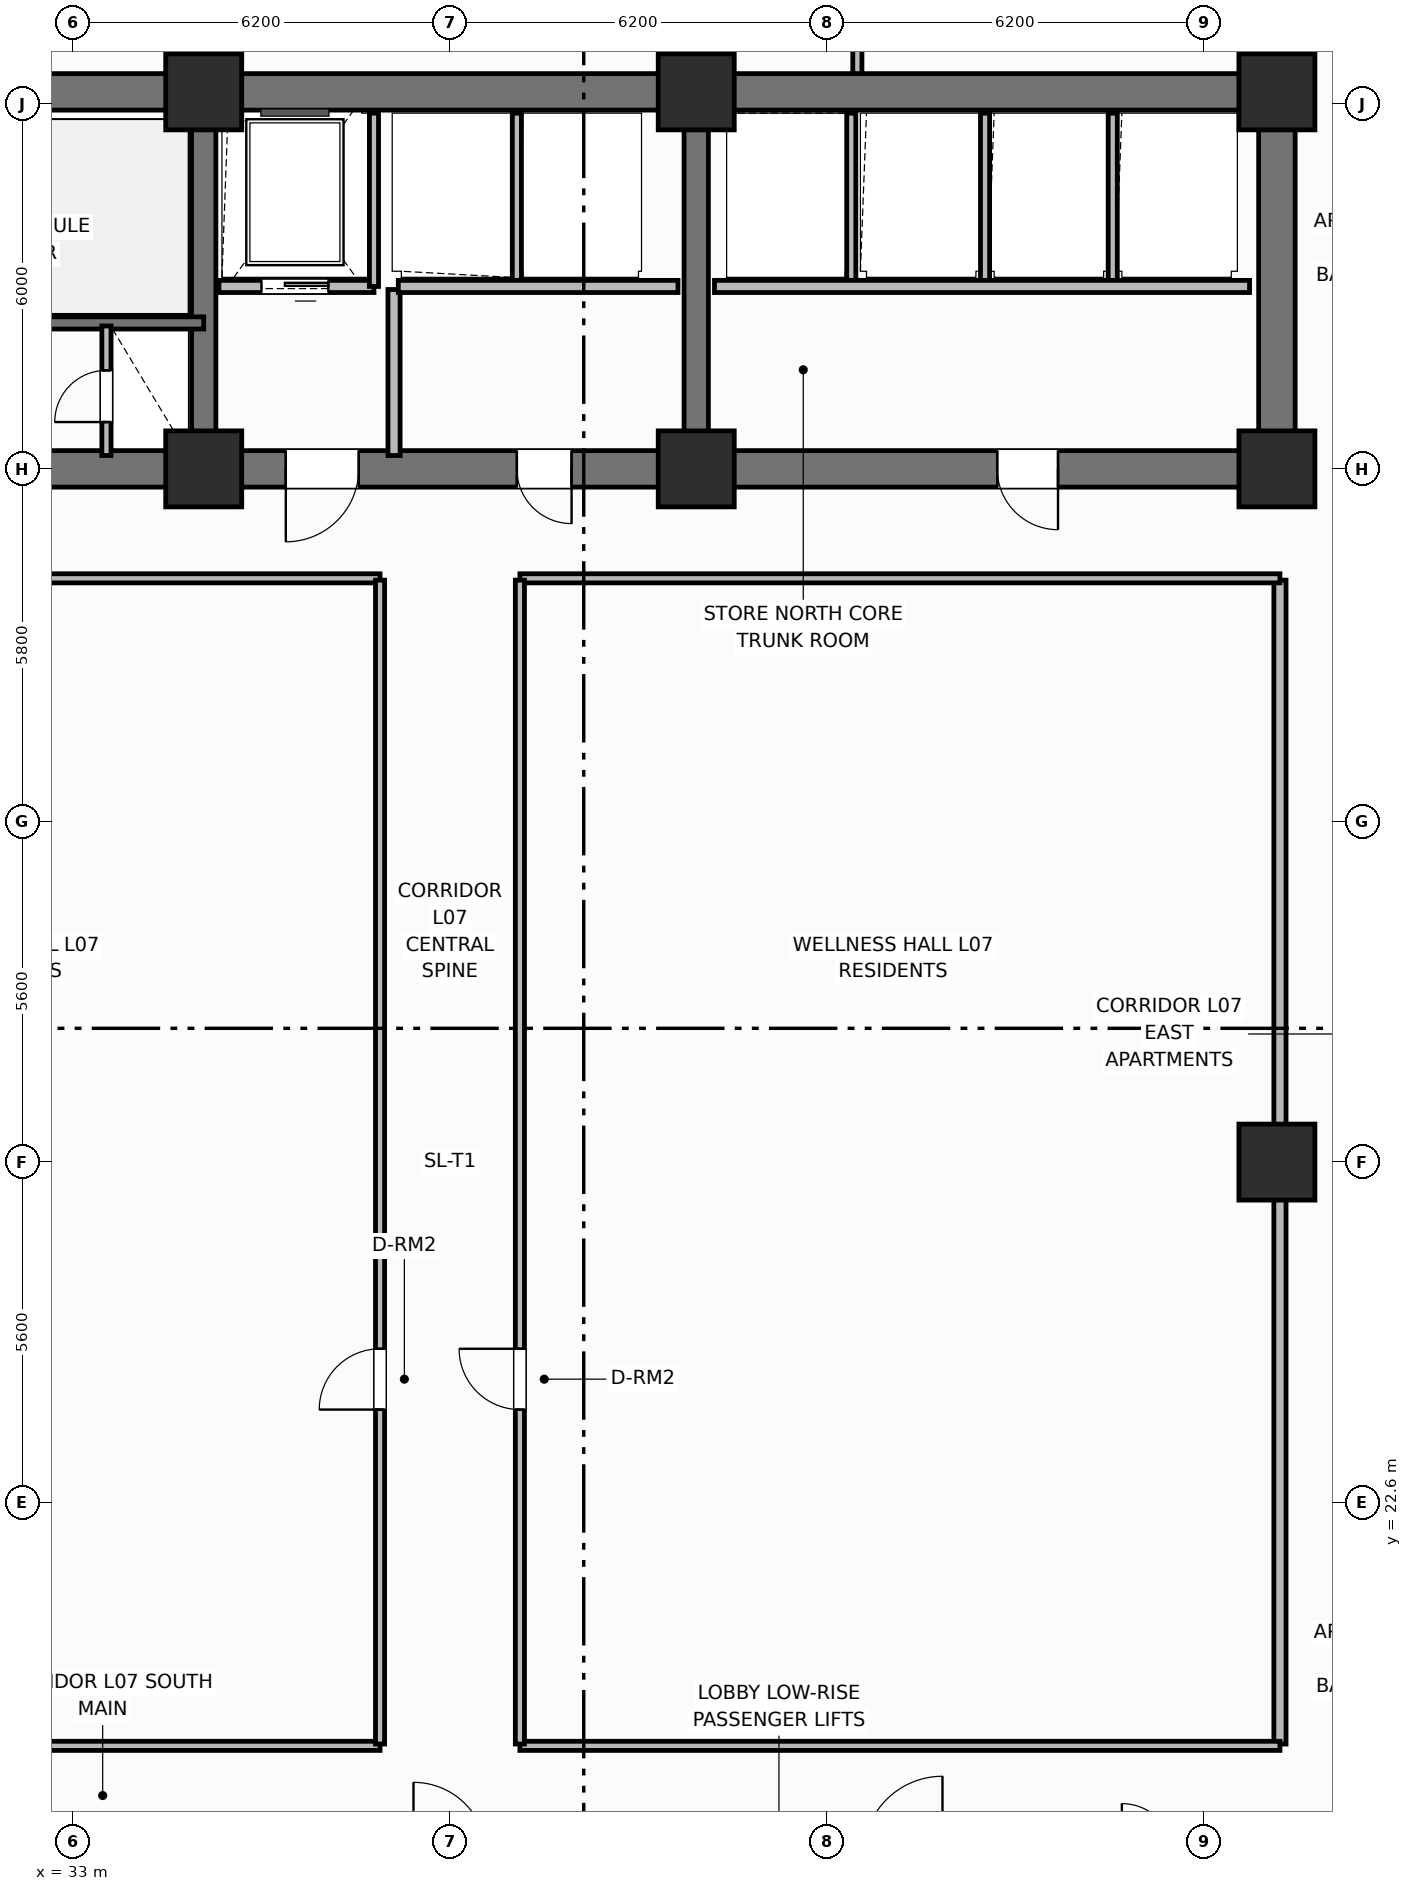
"""IFC4 building model, lengths in metres.
Left out: names, types, materials, properties, quantities, classifications, styles, units other than length and angle.
Written with IfcOpenShell. Run it as: python <this file> out.ifc"""

import sys

from ifc_helpers import new_model, si_unit, direction, frame, frame_2d, origin, origin_2d, place, context, subcontext, project, spatial, rectangle, extrude, element, fill, save


model = new_model("IFC4")
c1 = context("Model", 3, precision=1e-05, world=origin(), true_north=direction((0.0, 1.0)))
c2 = subcontext(c1, "Body", "Model", "MODEL_VIEW")
j1 = project(units=[si_unit("LENGTHUNIT", "METRE"), si_unit("PLANEANGLEUNIT", "RADIAN")], contexts=[c1])
p1 = place(None, origin())
s1 = spatial("IfcSite", under=j1, at=p1, CompositionType="ELEMENT")
p2 = place(p1, origin())
s2 = spatial("IfcBuilding", under=s1, at=p2, CompositionType="ELEMENT")
p3 = place(p2, frame((0.0, 0.0, 32.5)))
s3 = spatial("IfcBuildingStorey", under=s2, at=p3, CompositionType="ELEMENT", Elevation=32.5)
p4 = place(p3, frame((25.6, 45.8, 0.0), z_axis=(0.0, 0.0, 1.0), x_axis=(1.0, 0.0, 0.0)))
e1 = element("IfcWall", 1, at=p4, inside=s3, PredefinedType="SHEAR", context=c2, shape_type="SweptSolid", body=[
    extrude(rectangle(XDim=27.2, YDim=0.6, at=frame_2d((13.6, 0.0))), origin(), (0.0, 0.0, 1.0), 3.7),
])
p5 = place(p3, frame((52.8, 39.9, 0.0), z_axis=(0.0, 0.0, 1.0), x_axis=(0.0, 1.0, 0.0)))
e2 = element("IfcWall", 2, at=p5, inside=s3, PredefinedType="SHEAR", context=c2, shape_type="SweptSolid", body=[
    extrude(rectangle(XDim=5.6, YDim=0.6, at=frame_2d((2.8, 0.0))), origin(), (0.0, 0.0, 1.0), 3.7),
])
p6 = place(p3, frame((52.8, 39.6, 0.0), z_axis=(0.0, 0.0, 1.0), x_axis=(-1.0, 0.0, 0.0)))
e3 = element("IfcWall", 3, at=p6, inside=s3, PredefinedType="SHEAR", context=c2, shape_type="SweptSolid", body=[
    extrude(rectangle(XDim=27.2, YDim=0.6, at=frame_2d((13.6, 0.0))), origin(), (0.0, 0.0, 1.0), 3.7),
])
p7 = place(p6, frame((24.2, 0.0, 0.0)))
e4 = element("IfcOpeningElement", 4, at=p7, cuts=e3, PredefinedType="OPENING", context=c2, shape_type="SweptSolid", body=[
    extrude(rectangle(XDim=1.1, YDim=2.15, at=frame_2d((0.55, 1.075))), frame((0.0, 0.31, 0.0), z_axis=(0.0, -1.0, 0.0), x_axis=(1.0, 0.0, 0.0)), (0.0, 0.0, 1.0), 0.62),
])
p8 = place(p6, frame((15.1, 0.0, 0.0)))
e5 = element("IfcOpeningElement", 5, at=p8, cuts=e3, PredefinedType="OPENING", context=c2, shape_type="SweptSolid", body=[
    extrude(rectangle(XDim=1.2, YDim=2.15, at=frame_2d((0.6, 1.075))), frame((0.0, 0.31, 0.0), z_axis=(0.0, -1.0, 0.0), x_axis=(1.0, 0.0, 0.0)), (0.0, 0.0, 1.0), 0.62),
])
p9 = place(p6, frame((11.6, 0.0, 0.0)))
e6 = element("IfcOpeningElement", 6, at=p9, cuts=e3, PredefinedType="OPENING", context=c2, shape_type="SweptSolid", body=[
    extrude(rectangle(XDim=0.9, YDim=2.1, at=frame_2d((0.45, 1.05))), frame((0.0, 0.31, 0.0), z_axis=(0.0, -1.0, 0.0), x_axis=(1.0, 0.0, 0.0)), (0.0, 0.0, 1.0), 0.62),
])
p10 = place(p6, frame((3.6, 0.0, 0.0)))
e7 = element("IfcOpeningElement", 7, at=p10, cuts=e3, PredefinedType="OPENING", context=c2, shape_type="SweptSolid", body=[
    extrude(rectangle(XDim=1.0, YDim=2.15, at=frame_2d((0.5, 1.075))), frame((0.0, 0.31, 0.0), z_axis=(0.0, -1.0, 0.0), x_axis=(1.0, 0.0, 0.0)), (0.0, 0.0, 1.0), 0.62),
])
for number, where, z_axis, x_axis in (
    (8, (35.15, 39.9, 0.0), (0.0, 0.0, 1.0), (0.0, 1.0, 0.0)),
    (9, (43.25, 39.9, 0.0), (0.0, 0.0, 1.0), (0.0, 1.0, 0.0)),
):
    element("IfcWall", number, at=place(p3, frame(where, z_axis=z_axis, x_axis=x_axis)), inside=s3, PredefinedType="SHEAR", context=c2, shape_type="SweptSolid", body=[
        extrude(rectangle(XDim=5.6, YDim=0.4, at=frame_2d((2.8, 0.0))), origin(), (0.0, 0.0, 1.0), 3.7),
    ])
for number, where, z_axis, x_axis in (
    (10, (35.15, 39.6, 0.0), (0.0, 0.0, 1.0), (1.0, 0.0, 0.0)),
    (11, (35.15, 45.8, 0.0), (0.0, 0.0, 1.0), (1.0, 0.0, 0.0)),
    (12, (43.25, 39.6, 0.0), (0.0, 0.0, 1.0), (1.0, 0.0, 0.0)),
    (13, (43.25, 45.8, 0.0), (0.0, 0.0, 1.0), (1.0, 0.0, 0.0)),
    (14, (52.8, 39.6, 0.0), (0.0, 0.0, 1.0), (1.0, 0.0, 0.0)),
    (15, (52.8, 45.8, 0.0), (0.0, 0.0, 1.0), (1.0, 0.0, 0.0)),
    (16, (52.8, 28.2, 0.0), (0.0, 0.0, 1.0), (1.0, 0.0, 0.0)),
):
    element("IfcColumn", number, at=place(p3, frame(where, z_axis=z_axis, x_axis=x_axis)), inside=s3, PredefinedType="COLUMN", context=c2, shape_type="SweptSolid", body=[
        extrude(rectangle(XDim=1.25, YDim=1.25, at=origin_2d()), origin(), (0.0, 0.0, 1.0), 3.7),
    ])
p11 = place(p3, frame((35.15, 42.0, 0.0), z_axis=(0.0, 0.0, 1.0), x_axis=(-1.0, 0.0, 0.0)))
e17 = element("IfcWall", 17, at=p11, inside=s3, PredefinedType="SHEAR", context=c2, shape_type="SweptSolid", body=[
    extrude(rectangle(XDim=9.55, YDim=0.2, at=frame_2d((4.775, 0.0))), origin(), (0.0, 0.0, 1.0), 3.7),
])
p12 = place(p11, frame((7.25, 0.0, 0.0)))
e18 = element("IfcOpeningElement", 18, at=p12, cuts=e17, PredefinedType="OPENING", context=c2, shape_type="SweptSolid", body=[
    extrude(rectangle(XDim=1.1, YDim=2.15, at=frame_2d((0.55, 1.075))), frame((0.0, 0.11, 0.0), z_axis=(0.0, -1.0, 0.0), x_axis=(1.0, 0.0, 0.0)), (0.0, 0.0, 1.0), 0.22),
])
p13 = place(p3, frame((33.55, 39.82, 0.0), z_axis=(0.0, 0.0, 1.0), x_axis=(0.0, 1.0, 0.0)))
e19 = element("IfcWall", 19, at=p13, inside=s3, PredefinedType="PARTITIONING", context=c2, shape_type="SweptSolid", body=[
    extrude(rectangle(XDim=2.13, YDim=0.15, at=frame_2d((1.065, 0.0))), origin(), (0.0, 0.0, 1.0), 2.53),
])
p14 = place(p13, frame((0.55, 0.0, 0.0)))
e20 = element("IfcOpeningElement", 20, at=p14, cuts=e19, PredefinedType="OPENING", context=c2, shape_type="SweptSolid", body=[
    extrude(rectangle(XDim=0.85, YDim=2.05, at=frame_2d((0.425, 1.025))), frame((0.0, 0.085, 0.0), z_axis=(0.0, -1.0, 0.0), x_axis=(1.0, 0.0, 0.0)), (0.0, 0.0, 1.0), 0.17),
])
p15 = place(p3, frame((37.95, 42.6, 0.0), z_axis=(0.0, 0.0, 1.0), x_axis=(-1.0, 0.0, 0.0)))
e21 = element("IfcWall", 21, at=p15, inside=s3, PredefinedType="PARTITIONING", context=c2, shape_type="SweptSolid", body=[
    extrude(rectangle(XDim=2.55, YDim=0.2, at=frame_2d((1.275, 0.0))), origin(), (0.0, 0.0, 1.0), 2.3),
])
p16 = place(p15, frame((0.75, 0.0, 0.0)))
e22 = element("IfcOpeningElement", 22, at=p16, cuts=e21, PredefinedType="OPENING", context=c2, shape_type="SweptSolid", body=[
    extrude(rectangle(XDim=1.1, YDim=2.15, at=frame_2d((0.55, 1.075))), frame((0.0, 0.11, 0.0), z_axis=(0.0, -1.0, 0.0), x_axis=(1.0, 0.0, 0.0)), (0.0, 0.0, 1.0), 0.22),
])
p17 = place(p3, frame((37.95, 42.6, 0.0), z_axis=(0.0, 0.0, 1.0), x_axis=(0.0, 1.0, 0.0)))
e23 = element("IfcWall", 23, at=p17, inside=s3, PredefinedType="PARTITIONING", context=c2, shape_type="SweptSolid", body=[
    extrude(rectangle(XDim=2.85, YDim=0.15, at=frame_2d((1.425, 0.0))), origin(), (0.0, 0.0, 1.0), 2.53),
])
p18 = place(p3, frame((38.28, 39.82, 0.0), z_axis=(0.0, 0.0, 1.0), x_axis=(0.0, 1.0, 0.0)))
e24 = element("IfcWall", 24, at=p18, inside=s3, PredefinedType="PARTITIONING", context=c2, shape_type="SweptSolid", body=[
    extrude(rectangle(XDim=2.73, YDim=0.2, at=frame_2d((1.365, 0.0))), origin(), (0.0, 0.0, 1.0), 2.53),
])
p19 = place(p3, frame((40.3, 42.65, 0.0), z_axis=(0.0, 0.0, 1.0), x_axis=(0.0, 1.0, 0.0)))
e25 = element("IfcWall", 25, at=p19, inside=s3, PredefinedType="PARTITIONING", context=c2, shape_type="SweptSolid", body=[
    extrude(rectangle(XDim=2.8, YDim=0.15, at=frame_2d((1.4, 0.0))), origin(), (0.0, 0.0, 1.0), 2.53),
])
p20 = place(p3, frame((42.95, 42.6, 0.0), z_axis=(0.0, 0.0, 1.0), x_axis=(-1.0, 0.0, 0.0)))
e26 = element("IfcWall", 26, at=p20, inside=s3, PredefinedType="PARTITIONING", context=c2, shape_type="SweptSolid", body=[
    extrude(rectangle(XDim=4.6, YDim=0.2, at=frame_2d((2.3, 0.0))), origin(), (0.0, 0.0, 1.0), 2.3),
])
for number, where, z_axis, x_axis in (
    (27, (45.8, 42.65, 0.0), (0.0, 0.0, 1.0), (0.0, 1.0, 0.0)),
    (28, (48.0, 42.65, 0.0), (0.0, 0.0, 1.0), (0.0, 1.0, 0.0)),
    (29, (50.1, 42.65, 0.0), (0.0, 0.0, 1.0), (0.0, 1.0, 0.0)),
):
    element("IfcWall", number, at=place(p3, frame(where, z_axis=z_axis, x_axis=x_axis)), inside=s3, PredefinedType="PARTITIONING", context=c2, shape_type="SweptSolid", body=[
        extrude(rectangle(XDim=2.8, YDim=0.15, at=frame_2d((1.4, 0.0))), origin(), (0.0, 0.0, 1.0), 2.53),
    ])
p21 = place(p3, frame((52.35, 42.6, 0.0), z_axis=(0.0, 0.0, 1.0), x_axis=(-1.0, 0.0, 0.0)))
e30 = element("IfcWall", 30, at=p21, inside=s3, PredefinedType="PARTITIONING", context=c2, shape_type="SweptSolid", body=[
    extrude(rectangle(XDim=8.8, YDim=0.2, at=frame_2d((4.4, 0.0))), origin(), (0.0, 0.0, 1.0), 2.53),
])
p22 = place(p3, frame((52.85, 18.63, 0.0), z_axis=(0.0, 0.0, 1.0), x_axis=(0.0, 1.0, 0.0)))
e31 = element("IfcWall", 31, at=p22, inside=s3, PredefinedType="PARTITIONING", context=c2, shape_type="SweptSolid", body=[
    extrude(rectangle(XDim=19.14, YDim=0.2, at=frame_2d((9.57, 0.0))), origin(), (0.0, 0.0, 1.0), 2.53),
])
for number, where, z_axis, x_axis in (
    (32, (25.55, 18.6, 0.0), (0.0, 0.0, 1.0), (1.0, 0.0, 0.0)),
    (33, (40.35, 18.6, 0.0), (0.0, 0.0, 1.0), (1.0, 0.0, 0.0)),
    (34, (25.55, 37.8, 0.0), (0.0, 0.0, 1.0), (1.0, 0.0, 0.0)),
    (35, (40.35, 37.8, 0.0), (0.0, 0.0, 1.0), (1.0, 0.0, 0.0)),
):
    element("IfcWall", number, at=place(p3, frame(where, z_axis=z_axis, x_axis=x_axis)), inside=s3, PredefinedType="PARTITIONING", context=c2, shape_type="SweptSolid", body=[
        extrude(rectangle(XDim=12.5, YDim=0.15, at=frame_2d((6.25, 0.0))), origin(), (0.0, 0.0, 1.0), 2.53),
    ])
p23 = place(p3, frame((38.05, 18.63, 0.0), z_axis=(0.0, 0.0, 1.0), x_axis=(0.0, 1.0, 0.0)))
e36 = element("IfcWall", 36, at=p23, inside=s3, PredefinedType="PARTITIONING", context=c2, shape_type="SweptSolid", body=[
    extrude(rectangle(XDim=19.14, YDim=0.15, at=frame_2d((9.57, 0.0))), origin(), (0.0, 0.0, 1.0), 2.53),
])
p24 = place(p23, frame((5.5, 0.0, 0.0)))
e37 = element("IfcOpeningElement", 37, at=p24, cuts=e36, PredefinedType="OPENING", context=c2, shape_type="SweptSolid", body=[
    extrude(rectangle(XDim=1.0, YDim=2.15, at=frame_2d((0.5, 1.075))), frame((0.0, 0.085, 0.0), z_axis=(0.0, -1.0, 0.0), x_axis=(1.0, 0.0, 0.0)), (0.0, 0.0, 1.0), 0.17),
])
p25 = place(p3, frame((40.35, 18.63, 0.0), z_axis=(0.0, 0.0, 1.0), x_axis=(0.0, 1.0, 0.0)))
e38 = element("IfcWall", 38, at=p25, inside=s3, PredefinedType="PARTITIONING", context=c2, shape_type="SweptSolid", body=[
    extrude(rectangle(XDim=19.14, YDim=0.15, at=frame_2d((9.57, 0.0))), origin(), (0.0, 0.0, 1.0), 2.53),
])
p26 = place(p25, frame((5.5, 0.0, 0.0)))
e39 = element("IfcOpeningElement", 39, at=p26, cuts=e38, PredefinedType="OPENING", context=c2, shape_type="SweptSolid", body=[
    extrude(rectangle(XDim=1.0, YDim=2.15, at=frame_2d((0.5, 1.075))), frame((0.0, 0.085, 0.0), z_axis=(0.0, -1.0, 0.0), x_axis=(1.0, 0.0, 0.0)), (0.0, 0.0, 1.0), 0.17),
])
p27 = place(p3, frame((45.9, 46.1, 0.0), z_axis=(0.0, 0.0, 1.0), x_axis=(0.0, 1.0, 0.0)))
e40 = element("IfcWall", 40, at=p27, inside=s3, PredefinedType="PARTITIONING", context=c2, shape_type="SweptSolid", body=[
    extrude(rectangle(XDim=5.33, YDim=0.15, at=frame_2d((2.665, 0.0))), origin(), (0.0, 0.0, 1.0), 2.53),
])
p28 = place(p3, frame((53.0, 46.1, 0.0), z_axis=(0.0, 0.0, 1.0), x_axis=(0.0, 1.0, 0.0)))
e41 = element("IfcWall", 41, at=p28, inside=s3, PredefinedType="PARTITIONING", context=c2, shape_type="SweptSolid", body=[
    extrude(rectangle(XDim=4.73, YDim=0.2, at=frame_2d((2.365, 0.0))), origin(), (0.0, 0.0, 1.0), 2.53),
])
p29 = place(p28, frame((1.05, 0.0, 0.0)))
e42 = element("IfcOpeningElement", 42, at=p29, cuts=e41, PredefinedType="OPENING", context=c2, shape_type="SweptSolid", body=[
    extrude(rectangle(XDim=0.9, YDim=2.1, at=frame_2d((0.45, 1.05))), frame((0.0, 0.11, 0.0), z_axis=(0.0, -1.0, 0.0), x_axis=(1.0, 0.0, 0.0)), (0.0, 0.0, 1.0), 0.22),
])
p30 = place(p14, origin())
e43 = element("IfcDoor", 43, at=p30, inside=s3, OperationType="SINGLE_SWING_LEFT", PredefinedType="TRAPDOOR", context=c2, shape_type="SweptSolid", body=[
    extrude(rectangle(XDim=0.85, YDim=2.05, at=frame_2d((0.425, 1.025))), frame((0.0, 0.025, 0.0), z_axis=(0.0, -1.0, 0.0), x_axis=(1.0, 0.0, 0.0)), (0.0, 0.0, 1.0), 0.05),
])
fill(e20, e43)
p31 = place(p16, origin())
e44 = element("IfcDoor", 44, at=p31, inside=s3, OperationType="SLIDING_TO_LEFT", PredefinedType="DOOR", context=c2, shape_type="SweptSolid", body=[
    extrude(rectangle(XDim=1.1, YDim=2.15, at=frame_2d((0.55, 1.075))), frame((0.0, 0.025, 0.0), z_axis=(0.0, -1.0, 0.0), x_axis=(1.0, 0.0, 0.0)), (0.0, 0.0, 1.0), 0.05),
])
fill(e22, e44)
p32 = place(p24, origin())
e45 = element("IfcDoor", 45, at=p32, inside=s3, OperationType="SINGLE_SWING_LEFT", PredefinedType="DOOR", context=c2, shape_type="SweptSolid", body=[
    extrude(rectangle(XDim=1.0, YDim=2.15, at=frame_2d((0.5, 1.075))), frame((0.0, 0.025, 0.0), z_axis=(0.0, -1.0, 0.0), x_axis=(1.0, 0.0, 0.0)), (0.0, 0.0, 1.0), 0.05),
])
fill(e37, e45)
p33 = place(p26, origin())
e46 = element("IfcDoor", 46, at=p33, inside=s3, OperationType="SINGLE_SWING_RIGHT", PredefinedType="DOOR", context=c2, shape_type="SweptSolid", body=[
    extrude(rectangle(XDim=1.0, YDim=2.15, at=frame_2d((0.5, 1.075))), frame((0.0, 0.025, 0.0), z_axis=(0.0, -1.0, 0.0), x_axis=(1.0, 0.0, 0.0)), (0.0, 0.0, 1.0), 0.05),
])
fill(e39, e46)
p34 = place(p8, origin())
e47 = element("IfcDoor", 47, at=p34, inside=s3, OperationType="SINGLE_SWING_RIGHT", PredefinedType="DOOR", context=c2, shape_type="SweptSolid", body=[
    extrude(rectangle(XDim=1.2, YDim=2.15, at=frame_2d((0.6, 1.075))), frame((0.0, 0.025, 0.0), z_axis=(0.0, -1.0, 0.0), x_axis=(1.0, 0.0, 0.0)), (0.0, 0.0, 1.0), 0.05),
])
fill(e5, e47)
p35 = place(p9, origin())
e48 = element("IfcDoor", 48, at=p35, inside=s3, OperationType="SINGLE_SWING_LEFT", PredefinedType="DOOR", context=c2, shape_type="SweptSolid", body=[
    extrude(rectangle(XDim=0.9, YDim=2.1, at=frame_2d((0.45, 1.05))), frame((0.0, 0.025, 0.0), z_axis=(0.0, -1.0, 0.0), x_axis=(1.0, 0.0, 0.0)), (0.0, 0.0, 1.0), 0.05),
])
fill(e6, e48)
p36 = place(p10, origin())
e49 = element("IfcDoor", 49, at=p36, inside=s3, OperationType="SINGLE_SWING_LEFT", PredefinedType="DOOR", context=c2, shape_type="SweptSolid", body=[
    extrude(rectangle(XDim=1.0, YDim=2.15, at=frame_2d((0.5, 1.075))), frame((0.0, 0.025, 0.0), z_axis=(0.0, -1.0, 0.0), x_axis=(1.0, 0.0, 0.0)), (0.0, 0.0, 1.0), 0.05),
])
fill(e7, e49)
save(model, sys.argv[1])
